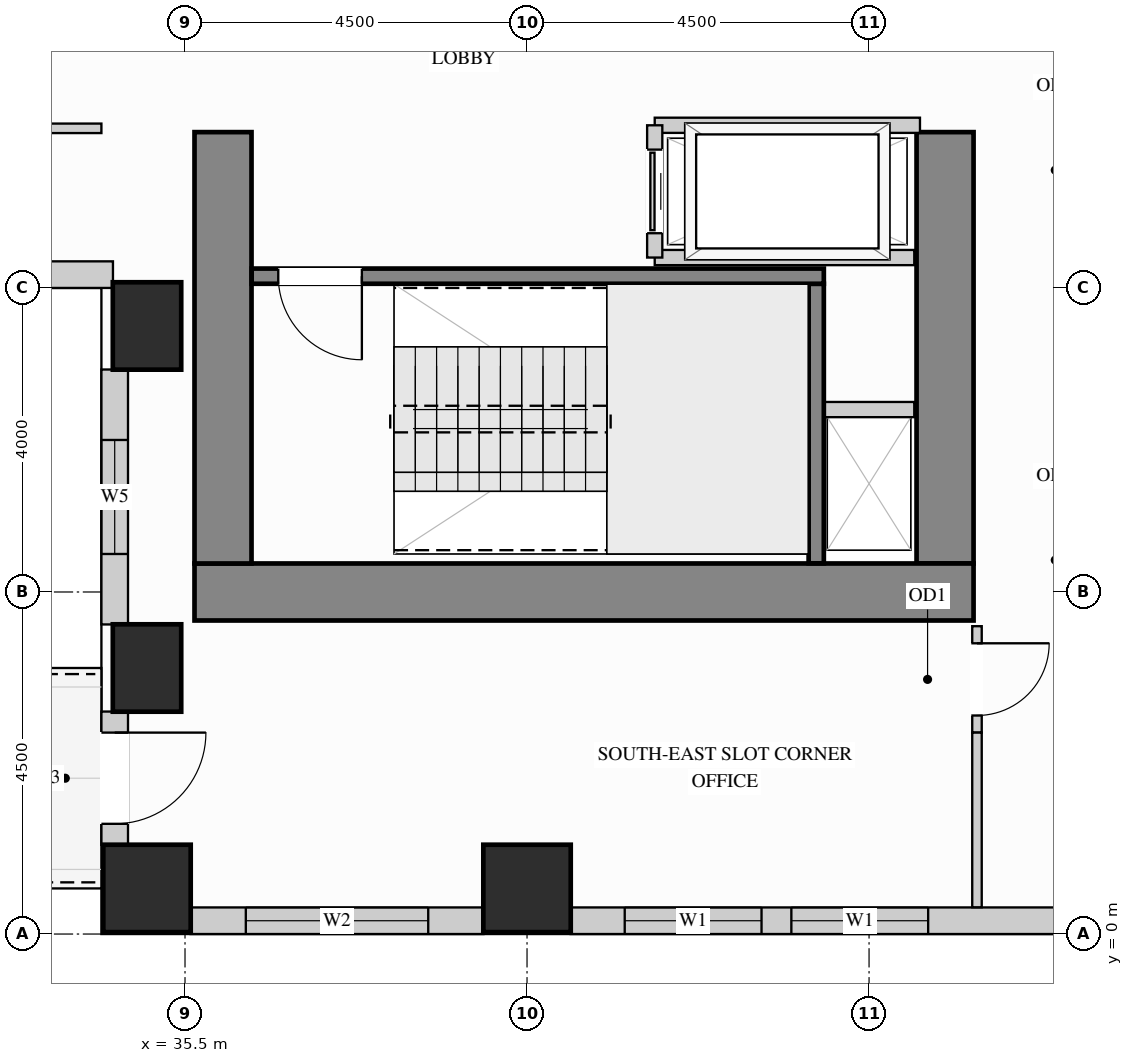
"""IFC4 building model, lengths in metres.
Left out: names, types, materials, properties, quantities, classifications, styles, units other than length and angle.
Written with IfcOpenShell. Run it as: python <this file> out.ifc"""

import sys

from ifc_helpers import new_model, si_unit, direction, frame, frame_2d, origin, origin_2d, place, context, subcontext, project, spatial, rectangle, extrude, source, transform, mapped, element, fill, save


model = new_model("IFC4")
c1 = context("Model", 3, precision=1e-05, world=origin(), true_north=direction((0.0, 1.0)))
c2 = subcontext(c1, "Body", "Model", "MODEL_VIEW")
j1 = project(units=[si_unit("LENGTHUNIT", "METRE"), si_unit("PLANEANGLEUNIT", "RADIAN")], contexts=[c1])
p1 = place(None, origin())
s1 = spatial("IfcSite", under=j1, at=p1, CompositionType="ELEMENT")
p2 = place(p1, origin())
s2 = spatial("IfcBuilding", under=s1, at=p2, CompositionType="ELEMENT")
p3 = place(p2, frame((0.0, 0.0, 91.8)))
s3 = spatial("IfcBuildingStorey", under=s2, at=p3, CompositionType="ELEMENT", Elevation=91.8)
m1 = source(origin(), c2, "Body", "SweptSolid", [
    extrude(rectangle(XDim=0.9, YDim=1.15, at=origin_2d()), origin(), (0.0, 0.0, 1.0), 3.38),
])
for number, where, z_axis, x_axis in (
    (1, (35.0, 3.5, 0.0), (0.0, 0.0, 1.0), (1.0, 0.0, 0.0)),
    (2, (35.0, 8.0, 0.0), (0.0, 0.0, 1.0), (1.0, 0.0, 0.0)),
):
    element("IfcColumn", number, at=place(p3, frame(where, z_axis=z_axis, x_axis=x_axis)), inside=s3, PredefinedType="COLUMN", context=c2, shape_type="MappedRepresentation", body=[
        mapped(m1, transform((0.0, 0.0, 0.0), x_axis=(1.0, 0.0, 0.0), y_axis=(0.0, 1.0, 0.0), z_axis=(0.0, 0.0, 1.0))),
    ])
m2 = source(origin(), c2, "Body", "SweptSolid", [
    extrude(rectangle(XDim=1.15, YDim=1.15, at=origin_2d()), origin(), (0.0, 0.0, 1.0), 3.38),
])
for number, where, z_axis, x_axis in (
    (3, (35.0, 0.6, 0.0), (0.0, 0.0, 1.0), (1.0, 0.0, 0.0)),
    (4, (40.0, 0.6, 0.0), (0.0, 0.0, 1.0), (1.0, 0.0, 0.0)),
):
    element("IfcColumn", number, at=place(p3, frame(where, z_axis=z_axis, x_axis=x_axis)), inside=s3, PredefinedType="COLUMN", context=c2, shape_type="MappedRepresentation", body=[
        mapped(m2, transform((0.0, 0.0, 0.0), x_axis=(1.0, 0.0, 0.0), y_axis=(0.0, 1.0, 0.0), z_axis=(0.0, 0.0, 1.0))),
    ])
m3 = source(origin(), c2, "Body", "SweptSolid", [
    extrude(rectangle(XDim=5.675, YDim=0.75, at=frame_2d((2.837, 0.0))), origin(), (0.0, 0.0, 1.0), 3.38),
])
p4 = place(p3, frame((45.5, 4.875, 0.0), z_axis=(0.0, 0.0, 1.0), x_axis=(0.0, 1.0, 0.0)))
e5 = element("IfcWall", 5, at=p4, inside=s3, PredefinedType="SHEAR", context=c2, shape_type="MappedRepresentation", body=[
    mapped(m3, transform((0.0, 0.0, 0.0), x_axis=(1.0, 0.0, 0.0), y_axis=(0.0, 1.0, 0.0), z_axis=(0.0, 0.0, 1.0))),
])
m4 = source(origin(), c2, "Body", "SweptSolid", [
    extrude(rectangle(XDim=10.25, YDim=0.75, at=frame_2d((5.125, 0.0))), origin(), (0.0, 0.0, 1.0), 3.38),
])
p5 = place(p3, frame((35.625, 4.5, 0.0), z_axis=(0.0, 0.0, 1.0), x_axis=(1.0, 0.0, 0.0)))
e6 = element("IfcWall", 6, at=p5, inside=s3, PredefinedType="SHEAR", context=c2, shape_type="MappedRepresentation", body=[
    mapped(m4, transform((0.0, 0.0, 0.0), x_axis=(1.0, 0.0, 0.0), y_axis=(0.0, 1.0, 0.0), z_axis=(0.0, 0.0, 1.0))),
])
p6 = place(p3, frame((36.0, 4.875, 0.0), z_axis=(0.0, 0.0, 1.0), x_axis=(0.0, 1.0, 0.0)))
e7 = element("IfcWall", 7, at=p6, inside=s3, PredefinedType="SHEAR", context=c2, shape_type="MappedRepresentation", body=[
    mapped(m3, transform((0.0, 0.0, 0.0), x_axis=(1.0, 0.0, 0.0), y_axis=(0.0, 1.0, 0.0), z_axis=(0.0, 0.0, 1.0))),
])
p7 = place(p3, frame((30.948, 8.675, 0.0), z_axis=(0.0, 0.0, 1.0), x_axis=(1.0, 0.0, 0.0)))
e8 = element("IfcWall", 8, at=p7, inside=s3, PredefinedType="SOLIDWALL", context=c2, shape_type="SweptSolid", body=[
    extrude(rectangle(XDim=3.604, YDim=0.35, at=frame_2d((1.802, 0.0))), origin(), (0.0, 0.0, 1.0), 3.365),
])
p8 = place(p7, frame((1.052, 0.0, 0.78)))
e9 = element("IfcOpeningElement", 9, at=p8, cuts=e8, PredefinedType="OPENING", context=c2, shape_type="SweptSolid", body=[
    extrude(rectangle(XDim=1.5, YDim=2.0, at=frame_2d((0.75, 1.0))), frame((0.0, 0.185, 0.0), z_axis=(0.0, -1.0, 0.0), x_axis=(1.0, 0.0, 0.0)), (0.0, 0.0, 1.0), 0.37),
])
p9 = place(p3, frame((34.575, 7.427, 0.0), z_axis=(0.0, 0.0, 1.0), x_axis=(0.0, -1.0, 0.0)))
e10 = element("IfcWall", 10, at=p9, inside=s3, PredefinedType="SOLIDWALL", context=c2, shape_type="SweptSolid", body=[
    extrude(rectangle(XDim=3.354, YDim=0.35, at=frame_2d((1.677, 0.0))), origin(), (0.0, 0.0, 1.0), 3.365),
])
p10 = place(p9, frame((0.927, 0.0, 0.78)))
e11 = element("IfcOpeningElement", 11, at=p10, cuts=e10, PredefinedType="OPENING", context=c2, shape_type="SweptSolid", body=[
    extrude(rectangle(XDim=1.5, YDim=2.0, at=frame_2d((0.75, 1.0))), frame((0.0, 0.185, 0.0), z_axis=(0.0, -1.0, 0.0), x_axis=(1.0, 0.0, 0.0)), (0.0, 0.0, 1.0), 0.37),
])
p11 = place(p3, frame((34.575, 2.927, 0.0), z_axis=(0.0, 0.0, 1.0), x_axis=(0.0, -1.0, 0.0)))
e12 = element("IfcWall", 12, at=p11, inside=s3, PredefinedType="SOLIDWALL", context=c2, shape_type="SweptSolid", body=[
    extrude(rectangle(XDim=1.754, YDim=0.35, at=frame_2d((0.877, 0.0))), origin(), (0.0, 0.0, 1.0), 3.365),
])
p12 = place(p11, frame((0.277, 0.0, 0.0)))
e13 = element("IfcOpeningElement", 13, at=p12, cuts=e12, PredefinedType="OPENING", context=c2, shape_type="SweptSolid", body=[
    extrude(rectangle(XDim=1.2, YDim=2.15, at=frame_2d((0.6, 1.075))), frame((0.0, 0.185, 0.0), z_axis=(0.0, -1.0, 0.0), x_axis=(1.0, 0.0, 0.0)), (0.0, 0.0, 1.0), 0.37),
])
p13 = place(p3, frame((35.573, 0.175, 0.0), z_axis=(0.0, 0.0, 1.0), x_axis=(1.0, 0.0, 0.0)))
e14 = element("IfcWall", 14, at=p13, inside=s3, PredefinedType="SOLIDWALL", context=c2, shape_type="SweptSolid", body=[
    extrude(rectangle(XDim=3.854, YDim=0.35, at=frame_2d((1.927, 0.0))), origin(), (0.0, 0.0, 1.0), 3.365),
])
p14 = place(p13, frame((0.727, 0.0, 0.78)))
e15 = element("IfcOpeningElement", 15, at=p14, cuts=e14, PredefinedType="OPENING", context=c2, shape_type="SweptSolid", body=[
    extrude(rectangle(XDim=2.4, YDim=2.1, at=frame_2d((1.2, 1.05))), frame((0.0, 0.185, 0.0), z_axis=(0.0, -1.0, 0.0), x_axis=(1.0, 0.0, 0.0)), (0.0, 0.0, 1.0), 0.37),
])
p15 = place(p3, frame((40.573, 0.175, 0.0), z_axis=(0.0, 0.0, 1.0), x_axis=(1.0, 0.0, 0.0)))
e16 = element("IfcWall", 16, at=p15, inside=s3, PredefinedType="SOLIDWALL", context=c2, shape_type="SweptSolid", body=[
    extrude(rectangle(XDim=6.454, YDim=0.35, at=frame_2d((3.227, 0.0))), origin(), (0.0, 0.0, 1.0), 3.365),
])
p16 = place(p15, frame((0.712, 0.0, 0.78)))
e17 = element("IfcOpeningElement", 17, at=p16, cuts=e16, PredefinedType="OPENING", context=c2, shape_type="SweptSolid", body=[
    extrude(rectangle(XDim=1.8, YDim=2.1, at=frame_2d((0.9, 1.05))), frame((0.0, 0.185, 0.0), z_axis=(0.0, -1.0, 0.0), x_axis=(1.0, 0.0, 0.0)), (0.0, 0.0, 1.0), 0.37),
])
p17 = place(p15, frame((2.905, 0.0, 0.78)))
e18 = element("IfcOpeningElement", 18, at=p17, cuts=e16, PredefinedType="OPENING", context=c2, shape_type="SweptSolid", body=[
    extrude(rectangle(XDim=1.8, YDim=2.1, at=frame_2d((0.9, 1.05))), frame((0.0, 0.185, 0.0), z_axis=(0.0, -1.0, 0.0), x_axis=(1.0, 0.0, 0.0)), (0.0, 0.0, 1.0), 0.37),
])
p18 = place(p3, frame((45.92, 2.65, 0.0), z_axis=(0.0, 0.0, 1.0), x_axis=(0.0, 1.0, 0.0)))
e19 = element("IfcWall", 19, at=p18, inside=s3, PredefinedType="PARTITIONING", context=c2, shape_type="SweptSolid", body=[
    extrude(rectangle(XDim=1.4, YDim=0.125, at=frame_2d((0.7, 0.0))), origin(), (0.0, 0.0, 1.0), 3.365),
])
p19 = place(p18, frame((0.225, 0.0, 0.0)))
e20 = element("IfcOpeningElement", 20, at=p19, cuts=e19, PredefinedType="OPENING", context=c2, shape_type="SweptSolid", body=[
    extrude(rectangle(XDim=0.95, YDim=2.15, at=frame_2d((0.475, 1.075))), frame((0.0, 0.073, 0.0), z_axis=(0.0, -1.0, 0.0), x_axis=(1.0, 0.0, 0.0)), (0.0, 0.0, 1.0), 0.145),
])
m5 = source(origin(), c2, "Body", "SweptSolid", [
    extrude(rectangle(XDim=2.298, YDim=0.125, at=frame_2d((1.149, 0.0))), origin(), (0.0, 0.0, 1.0), 3.365),
])
p20 = place(p3, frame((45.92, 0.352, 0.0), z_axis=(0.0, 0.0, 1.0), x_axis=(0.0, 1.0, 0.0)))
e21 = element("IfcWall", 21, at=p20, inside=s3, PredefinedType="PARTITIONING", context=c2, shape_type="MappedRepresentation", body=[
    mapped(m5, transform((0.0, 0.0, 0.0), x_axis=(1.0, 0.0, 0.0), y_axis=(0.0, 1.0, 0.0), z_axis=(0.0, 0.0, 1.0))),
])
p21 = place(p3, frame((19.5, 10.6, 0.0), z_axis=(0.0, 0.0, 1.0), x_axis=(1.0, 0.0, 0.0)))
e22 = element("IfcWall", 22, at=p21, inside=s3, PredefinedType="PARTITIONING", context=c2, shape_type="SweptSolid", body=[
    extrude(rectangle(XDim=14.9, YDim=0.125, at=frame_2d((7.45, 0.0))), origin(), (0.0, 0.0, 1.0), 3.365),
])
p22 = place(p21, frame((6.975, 0.0, 0.0)))
e23 = element("IfcOpeningElement", 23, at=p22, cuts=e22, PredefinedType="OPENING", context=c2, shape_type="SweptSolid", body=[
    extrude(rectangle(XDim=0.95, YDim=2.15, at=frame_2d((0.475, 1.075))), frame((0.0, 0.073, 0.0), z_axis=(0.0, -1.0, 0.0), x_axis=(1.0, 0.0, 0.0)), (0.0, 0.0, 1.0), 0.145),
])
m6 = source(origin(), c2, "Body", "SweptSolid", [
    extrude(rectangle(XDim=1.245, YDim=0.2, at=frame_2d((0.623, 0.0))), origin(), (0.0, 0.0, 1.0), 3.365),
])
p23 = place(p3, frame((43.85, 6.9, 0.0), z_axis=(0.0, 0.0, 1.0), x_axis=(1.0, 0.0, 0.0)))
e24 = element("IfcWall", 24, at=p23, inside=s3, PredefinedType="PARTITIONING", context=c2, shape_type="MappedRepresentation", body=[
    mapped(m6, transform((0.0, 0.0, 0.0), x_axis=(1.0, 0.0, 0.0), y_axis=(0.0, 1.0, 0.0), z_axis=(0.0, 0.0, 1.0))),
])
m7 = source(origin(), c2, "Body", "SweptSolid", [
    extrude(rectangle(XDim=3.49, YDim=0.2, at=frame_2d((1.745, 0.0))), origin(), (0.0, 0.0, 1.0), 3.365),
])
p24 = place(p3, frame((41.68, 10.64, 0.0), z_axis=(0.0, 0.0, 1.0), x_axis=(1.0, 0.0, 0.0)))
e25 = element("IfcWall", 25, at=p24, inside=s3, PredefinedType="PARTITIONING", context=c2, shape_type="MappedRepresentation", body=[
    mapped(m7, transform((0.0, 0.0, 0.0), x_axis=(1.0, 0.0, 0.0), y_axis=(0.0, 1.0, 0.0), z_axis=(0.0, 0.0, 1.0))),
])
m8 = source(origin(), c2, "Body", "SweptSolid", [
    extrude(rectangle(XDim=3.415, YDim=0.2, at=frame_2d((1.708, 0.0))), origin(), (0.0, 0.0, 1.0), 3.365),
])
p25 = place(p3, frame((41.68, 8.9, 0.0), z_axis=(0.0, 0.0, 1.0), x_axis=(1.0, 0.0, 0.0)))
e26 = element("IfcWall", 26, at=p25, inside=s3, PredefinedType="PARTITIONING", context=c2, shape_type="MappedRepresentation", body=[
    mapped(m8, transform((0.0, 0.0, 0.0), x_axis=(1.0, 0.0, 0.0), y_axis=(0.0, 1.0, 0.0), z_axis=(0.0, 0.0, 1.0))),
])
p26 = place(p3, frame((41.68, 8.9, 0.0), z_axis=(0.0, 0.0, 1.0), x_axis=(0.0, 1.0, 0.0)))
e27 = element("IfcWall", 27, at=p26, inside=s3, PredefinedType="PARTITIONING", context=c2, shape_type="SweptSolid", body=[
    extrude(rectangle(XDim=1.74, YDim=0.2, at=frame_2d((0.87, 0.0))), origin(), (0.0, 0.0, 1.0), 3.365),
])
p27 = place(p26, frame((0.32, 0.0, 0.0)))
e28 = element("IfcOpeningElement", 28, at=p27, cuts=e27, PredefinedType="OPENING", context=c2, shape_type="SweptSolid", body=[
    extrude(rectangle(XDim=1.1, YDim=2.2, at=frame_2d((0.55, 1.1))), frame((0.0, 0.11, 0.0), z_axis=(0.0, -1.0, 0.0), x_axis=(1.0, 0.0, 0.0)), (0.0, 0.0, 1.0), 0.22),
])
m9 = source(origin(), c2, "Body", "SweptSolid", [
    extrude(rectangle(XDim=3.678, YDim=0.2, at=frame_2d((1.839, 0.0))), origin(), (0.0, 0.0, 1.0), 3.38),
])
p28 = place(p3, frame((43.805, 4.877, 0.0), z_axis=(0.0, 0.0, 1.0), x_axis=(0.0, 1.0, 0.0)))
e29 = element("IfcWall", 29, at=p28, inside=s3, PredefinedType="SHEAR", context=c2, shape_type="MappedRepresentation", body=[
    mapped(m9, transform((0.0, 0.0, 0.0), x_axis=(1.0, 0.0, 0.0), y_axis=(0.0, 1.0, 0.0), z_axis=(0.0, 0.0, 1.0))),
])
p29 = place(p3, frame((36.377, 8.655, 0.0), z_axis=(0.0, 0.0, 1.0), x_axis=(1.0, 0.0, 0.0)))
e30 = element("IfcWall", 30, at=p29, inside=s3, PredefinedType="SHEAR", context=c2, shape_type="SweptSolid", body=[
    extrude(rectangle(XDim=7.528, YDim=0.2, at=frame_2d((3.764, 0.0))), origin(), (0.0, 0.0, 1.0), 3.38),
])
p30 = place(p29, frame((0.35, 0.0, 0.0)))
e31 = element("IfcOpeningElement", 31, at=p30, cuts=e30, PredefinedType="OPENING", context=c2, shape_type="SweptSolid", body=[
    extrude(rectangle(XDim=1.1, YDim=2.15, at=frame_2d((0.55, 1.075))), frame((0.0, 0.11, 0.0), z_axis=(0.0, -1.0, 0.0), x_axis=(1.0, 0.0, 0.0)), (0.0, 0.0, 1.0), 0.22),
])
m10 = source(origin(), c2, "Body", "SweptSolid", [
    extrude(rectangle(XDim=1.2, YDim=2.15, at=frame_2d((0.6, 1.075))), frame((0.0, 0.025, 0.0), z_axis=(0.0, -1.0, 0.0), x_axis=(1.0, 0.0, 0.0)), (0.0, 0.0, 1.0), 0.05),
])
p31 = place(p12, frame((1.2, 0.0, 0.0), z_axis=(0.0, 0.0, 1.0), x_axis=(-1.0, 0.0, 0.0)))
e32 = element("IfcDoor", 32, at=p31, inside=s3, OperationType="SINGLE_SWING_LEFT", PredefinedType="DOOR", context=c2, shape_type="MappedRepresentation", body=[
    mapped(m10, transform((0.0, 0.0, 0.0), x_axis=(1.0, 0.0, 0.0), y_axis=(0.0, 1.0, 0.0), z_axis=(0.0, 0.0, 1.0))),
])
fill(e13, e32)
m11 = source(origin(), c2, "Body", "SweptSolid", [
    extrude(rectangle(XDim=1.1, YDim=2.2, at=frame_2d((0.55, 1.1))), frame((0.0, 0.025, 0.0), z_axis=(0.0, -1.0, 0.0), x_axis=(1.0, 0.0, 0.0)), (0.0, 0.0, 1.0), 0.05),
])
p32 = place(p27, origin())
e33 = element("IfcDoor", 33, at=p32, inside=s3, OperationType="SLIDING_TO_LEFT", PredefinedType="DOOR", context=c2, shape_type="MappedRepresentation", body=[
    mapped(m11, transform((0.0, 0.0, 0.0), x_axis=(1.0, 0.0, 0.0), y_axis=(0.0, 1.0, 0.0), z_axis=(0.0, 0.0, 1.0))),
])
fill(e28, e33)
m12 = source(origin(), c2, "Body", "SweptSolid", [
    extrude(rectangle(XDim=0.95, YDim=2.15, at=frame_2d((0.475, 1.075))), frame((0.0, 0.025, 0.0), z_axis=(0.0, -1.0, 0.0), x_axis=(1.0, 0.0, 0.0)), (0.0, 0.0, 1.0), 0.05),
])
p33 = place(p19, origin())
e34 = element("IfcDoor", 34, at=p33, inside=s3, OperationType="SINGLE_SWING_RIGHT", PredefinedType="DOOR", context=c2, shape_type="MappedRepresentation", body=[
    mapped(m12, transform((0.0, 0.0, 0.0), x_axis=(1.0, 0.0, 0.0), y_axis=(0.0, 1.0, 0.0), z_axis=(0.0, 0.0, 1.0))),
])
fill(e20, e34)
m13 = source(origin(), c2, "Body", "SweptSolid", [
    extrude(rectangle(XDim=1.1, YDim=2.15, at=frame_2d((0.55, 1.075))), frame((0.0, 0.025, 0.0), z_axis=(0.0, -1.0, 0.0), x_axis=(1.0, 0.0, 0.0)), (0.0, 0.0, 1.0), 0.05),
])
p34 = place(p30, origin())
e35 = element("IfcDoor", 35, at=p34, inside=s3, OperationType="SINGLE_SWING_RIGHT", PredefinedType="DOOR", context=c2, shape_type="MappedRepresentation", body=[
    mapped(m13, transform((0.0, 0.0, 0.0), x_axis=(1.0, 0.0, 0.0), y_axis=(0.0, 1.0, 0.0), z_axis=(0.0, 0.0, 1.0))),
])
fill(e31, e35)
m14 = source(origin(), c2, "Body", "SweptSolid", [
    extrude(rectangle(XDim=1.8, YDim=2.1, at=frame_2d((0.9, 1.05))), frame((0.0, 0.03, 0.0), z_axis=(0.0, -1.0, 0.0), x_axis=(1.0, 0.0, 0.0)), (0.0, 0.0, 1.0), 0.06),
])
p35 = place(p16, origin())
e36 = element("IfcWindow", 36, at=p35, inside=s3, PartitioningType="SINGLE_PANEL", PredefinedType="WINDOW", context=c2, shape_type="MappedRepresentation", body=[
    mapped(m14, transform((0.0, 0.0, 0.0), x_axis=(1.0, 0.0, 0.0), y_axis=(0.0, 1.0, 0.0), z_axis=(0.0, 0.0, 1.0))),
])
fill(e17, e36)
p36 = place(p17, origin())
e37 = element("IfcWindow", 37, at=p36, inside=s3, PartitioningType="SINGLE_PANEL", PredefinedType="WINDOW", context=c2, shape_type="MappedRepresentation", body=[
    mapped(m14, transform((0.0, 0.0, 0.0), x_axis=(1.0, 0.0, 0.0), y_axis=(0.0, 1.0, 0.0), z_axis=(0.0, 0.0, 1.0))),
])
fill(e18, e37)
m15 = source(origin(), c2, "Body", "SweptSolid", [
    extrude(rectangle(XDim=2.4, YDim=2.1, at=frame_2d((1.2, 1.05))), frame((0.0, 0.03, 0.0), z_axis=(0.0, -1.0, 0.0), x_axis=(1.0, 0.0, 0.0)), (0.0, 0.0, 1.0), 0.06),
])
p37 = place(p14, origin())
e38 = element("IfcWindow", 38, at=p37, inside=s3, PartitioningType="SINGLE_PANEL", PredefinedType="WINDOW", context=c2, shape_type="MappedRepresentation", body=[
    mapped(m15, transform((0.0, 0.0, 0.0), x_axis=(1.0, 0.0, 0.0), y_axis=(0.0, 1.0, 0.0), z_axis=(0.0, 0.0, 1.0))),
])
fill(e15, e38)
m16 = source(origin(), c2, "Body", "SweptSolid", [
    extrude(rectangle(XDim=1.5, YDim=2.0, at=frame_2d((0.75, 1.0))), frame((0.0, 0.03, 0.0), z_axis=(0.0, -1.0, 0.0), x_axis=(1.0, 0.0, 0.0)), (0.0, 0.0, 1.0), 0.06),
])
p38 = place(p10, origin())
e39 = element("IfcWindow", 39, at=p38, inside=s3, PartitioningType="SINGLE_PANEL", PredefinedType="WINDOW", context=c2, shape_type="MappedRepresentation", body=[
    mapped(m16, transform((0.0, 0.0, 0.0), x_axis=(1.0, 0.0, 0.0), y_axis=(0.0, 1.0, 0.0), z_axis=(0.0, 0.0, 1.0))),
])
fill(e11, e39)
save(model, sys.argv[1])
